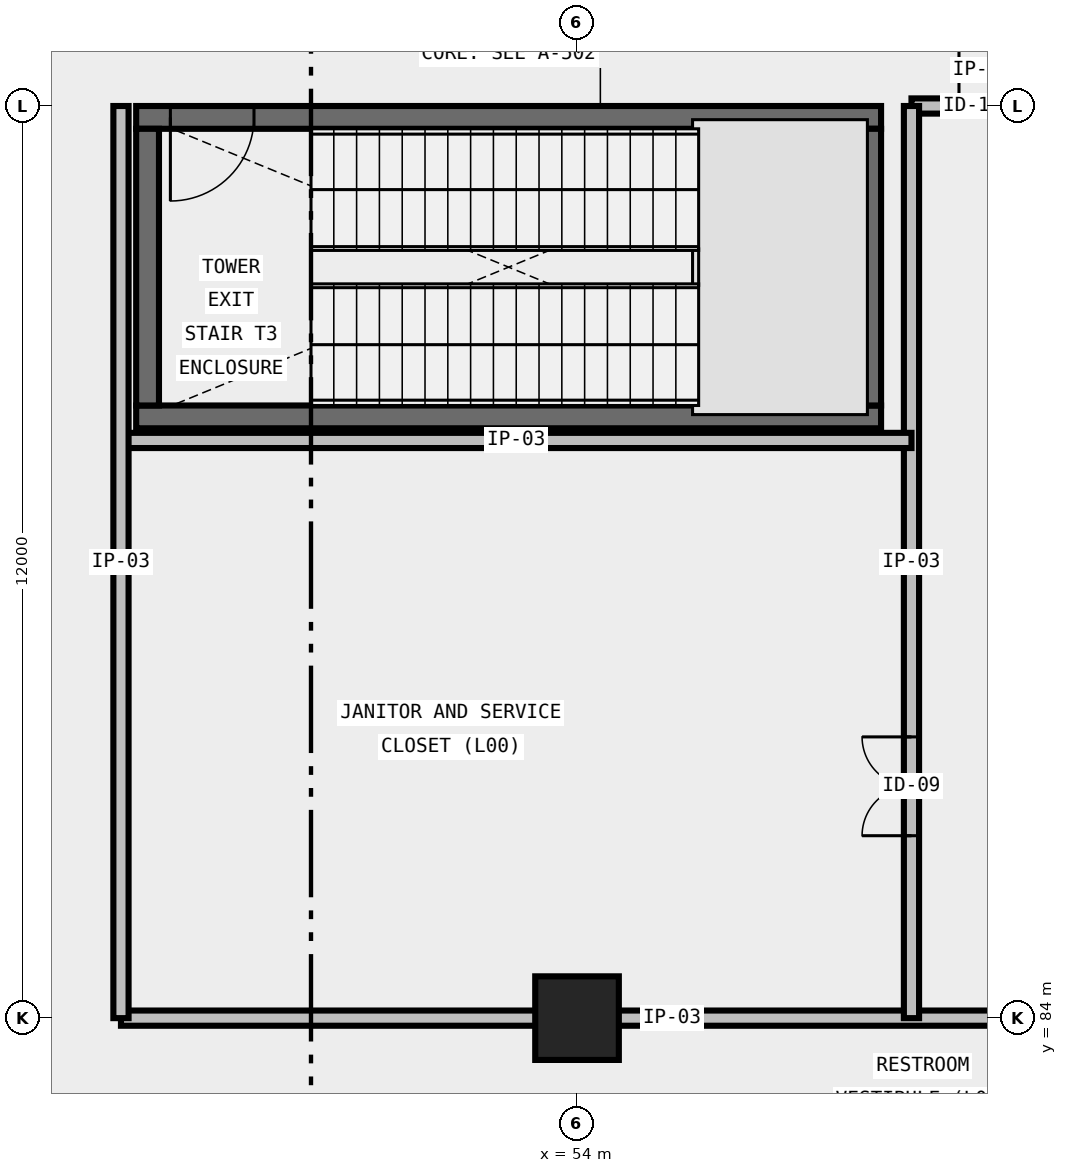
"""IFC4 building model, lengths in metres.
Left out: names, types, materials, properties, quantities, classifications, styles, units other than length and angle.
Written with IfcOpenShell. Run it as: python <this file> out.ifc"""

import sys

from ifc_helpers import new_model, si_unit, direction, frame, frame_2d, origin, origin_2d, place, context, subcontext, project, spatial, rectangle, extrude, element, fill, save


model = new_model("IFC4")
c1 = context("Model", 3, precision=1e-05, world=origin(), true_north=direction((0.0, 1.0)))
c2 = subcontext(c1, "Body", "Model", "MODEL_VIEW")
j1 = project(units=[si_unit("LENGTHUNIT", "METRE"), si_unit("PLANEANGLEUNIT", "RADIAN")], contexts=[c1])
p1 = place(None, origin())
s1 = spatial("IfcSite", under=j1, at=p1, CompositionType="ELEMENT")
p2 = place(p1, origin())
s2 = spatial("IfcBuilding", under=s1, at=p2, CompositionType="ELEMENT")
p3 = place(p2, origin())
s3 = spatial("IfcBuildingStorey", under=s2, at=p3, CompositionType="ELEMENT", Elevation=0.0)
p4 = place(p3, frame((54.0, 84.0, 0.0), z_axis=(0.0, 0.0, 1.0), x_axis=(1.0, 0.0, 0.0)))
e1 = element("IfcColumn", 1, at=p4, inside=s3, PredefinedType="COLUMN", context=c2, shape_type="SweptSolid", body=[
    extrude(rectangle(XDim=1.1, YDim=1.1, at=origin_2d()), origin(), (0.0, 0.0, 1.0), 6.0),
])
p5 = place(p3, frame((48.2, 91.91, 0.0), z_axis=(0.0, 0.0, 1.0), x_axis=(1.0, 0.0, 0.0)))
e2 = element("IfcWall", 2, at=p5, inside=s3, PredefinedType="SHEAR", context=c2, shape_type="SweptSolid", body=[
    extrude(rectangle(XDim=9.8, YDim=0.3, at=frame_2d((4.9, 0.0))), origin(), (0.0, 0.0, 1.0), 6.0),
])
p6 = place(p3, frame((58.0, 95.85, 0.0), z_axis=(0.0, 0.0, 1.0), x_axis=(-1.0, 0.0, 0.0)))
e3 = element("IfcWall", 3, at=p6, inside=s3, PredefinedType="SHEAR", context=c2, shape_type="SweptSolid", body=[
    extrude(rectangle(XDim=9.8, YDim=0.3, at=frame_2d((4.9, 0.0))), origin(), (0.0, 0.0, 1.0), 6.0),
])
p7 = place(p6, frame((8.25, 0.0, 0.0)))
e4 = element("IfcOpeningElement", 4, at=p7, cuts=e3, PredefinedType="OPENING", context=c2, shape_type="SweptSolid", body=[
    extrude(rectangle(XDim=1.1, YDim=2.2, at=frame_2d((0.55, 1.1))), frame((0.0, 0.165, 0.0), z_axis=(0.0, -1.0, 0.0), x_axis=(1.0, 0.0, 0.0)), (0.0, 0.0, 1.0), 0.33),
])
for number, where, z_axis, x_axis in (
    (5, (48.35, 95.7, 0.0), (0.0, 0.0, 1.0), (0.0, -1.0, 0.0)),
    (6, (57.85, 92.06, 0.0), (0.0, 0.0, 1.0), (0.0, 1.0, 0.0)),
):
    element("IfcWall", number, at=place(p3, frame(where, z_axis=z_axis, x_axis=x_axis)), inside=s3, PredefinedType="SHEAR", context=c2, shape_type="SweptSolid", body=[
        extrude(rectangle(XDim=3.64, YDim=0.3, at=frame_2d((1.82, 0.0))), origin(), (0.0, 0.0, 1.0), 6.0),
    ])
p8 = place(p3, frame((48.0, 84.0, 0.0), z_axis=(0.0, 0.0, 1.0), x_axis=(1.0, 0.0, 0.0)))
e7 = element("IfcWall", 7, at=p8, inside=s3, PredefinedType="PARTITIONING", context=c2, shape_type="SweptSolid", body=[
    extrude(rectangle(XDim=18.0, YDim=0.2, at=frame_2d((9.0, 0.0))), origin(), (0.0, 0.0, 1.0), 4.902),
])
p9 = place(p3, frame((58.4, 96.0, 0.0), z_axis=(0.0, 0.0, 1.0), x_axis=(1.0, 0.0, 0.0)))
e8 = element("IfcWall", 8, at=p9, inside=s3, PredefinedType="PARTITIONING", context=c2, shape_type="SweptSolid", body=[
    extrude(rectangle(XDim=2.4, YDim=0.2, at=frame_2d((1.2, 0.0))), origin(), (0.0, 0.0, 1.0), 4.749),
])
p10 = place(p9, frame((0.625, 0.0, 0.0)))
e9 = element("IfcOpeningElement", 9, at=p10, cuts=e8, PredefinedType="OPENING", context=c2, shape_type="SweptSolid", body=[
    extrude(rectangle(XDim=0.95, YDim=2.15, at=frame_2d((0.475, 1.075))), frame((0.0, 0.115, 0.0), z_axis=(0.0, -1.0, 0.0), x_axis=(1.0, 0.0, 0.0)), (0.0, 0.0, 1.0), 0.23),
])
p11 = place(p3, frame((58.4, 84.0, 0.0), z_axis=(0.0, 0.0, 1.0), x_axis=(0.0, 1.0, 0.0)))
e10 = element("IfcWall", 10, at=p11, inside=s3, PredefinedType="PARTITIONING", context=c2, shape_type="SweptSolid", body=[
    extrude(rectangle(XDim=12.0, YDim=0.2, at=frame_2d((6.0, 0.0))), origin(), (0.0, 0.0, 1.0), 5.68),
])
p12 = place(p11, frame((2.4, 0.0, 0.0)))
e11 = element("IfcOpeningElement", 11, at=p12, cuts=e10, PredefinedType="OPENING", context=c2, shape_type="SweptSolid", body=[
    extrude(rectangle(XDim=1.3, YDim=2.2, at=frame_2d((0.65, 1.1))), frame((0.0, 0.115, 0.0), z_axis=(0.0, -1.0, 0.0), x_axis=(1.0, 0.0, 0.0)), (0.0, 0.0, 1.0), 0.23),
])
p13 = place(p3, frame((48.0, 91.6, 0.0), z_axis=(0.0, 0.0, 1.0), x_axis=(1.0, 0.0, 0.0)))
e12 = element("IfcWall", 12, at=p13, inside=s3, PredefinedType="PARTITIONING", context=c2, shape_type="SweptSolid", body=[
    extrude(rectangle(XDim=10.4, YDim=0.2, at=frame_2d((5.2, 0.0))), origin(), (0.0, 0.0, 1.0), 5.68),
])
p14 = place(p3, frame((48.0, 84.0, 0.0), z_axis=(0.0, 0.0, 1.0), x_axis=(0.0, 1.0, 0.0)))
e13 = element("IfcWall", 13, at=p14, inside=s3, PredefinedType="PARTITIONING", context=c2, shape_type="SweptSolid", body=[
    extrude(rectangle(XDim=12.0, YDim=0.2, at=frame_2d((6.0, 0.0))), origin(), (0.0, 0.0, 1.0), 5.68),
])
p15 = place(p7, origin())
e14 = element("IfcDoor", 14, at=p15, inside=s3, OperationType="SINGLE_SWING_RIGHT", PredefinedType="DOOR", context=c2, shape_type="SweptSolid", body=[
    extrude(rectangle(XDim=1.1, YDim=2.2, at=frame_2d((0.55, 1.1))), frame((0.0, 0.025, 0.0), z_axis=(0.0, -1.0, 0.0), x_axis=(1.0, 0.0, 0.0)), (0.0, 0.0, 1.0), 0.05),
])
fill(e4, e14)
p16 = place(p10, origin())
e15 = element("IfcDoor", 15, at=p16, inside=s3, OperationType="SINGLE_SWING_LEFT", PredefinedType="DOOR", context=c2, shape_type="SweptSolid", body=[
    extrude(rectangle(XDim=0.95, YDim=2.15, at=frame_2d((0.475, 1.075))), frame((0.0, 0.025, 0.0), z_axis=(0.0, -1.0, 0.0), x_axis=(1.0, 0.0, 0.0)), (0.0, 0.0, 1.0), 0.05),
])
fill(e9, e15)
p17 = place(p12, origin())
e16 = element("IfcDoor", 16, at=p17, inside=s3, OperationType="DOUBLE_DOOR_SINGLE_SWING", PredefinedType="DOOR", context=c2, shape_type="SweptSolid", body=[
    extrude(rectangle(XDim=1.3, YDim=2.2, at=frame_2d((0.65, 1.1))), frame((0.0, 0.025, 0.0), z_axis=(0.0, -1.0, 0.0), x_axis=(1.0, 0.0, 0.0)), (0.0, 0.0, 1.0), 0.05),
])
fill(e11, e16)
save(model, sys.argv[1])
